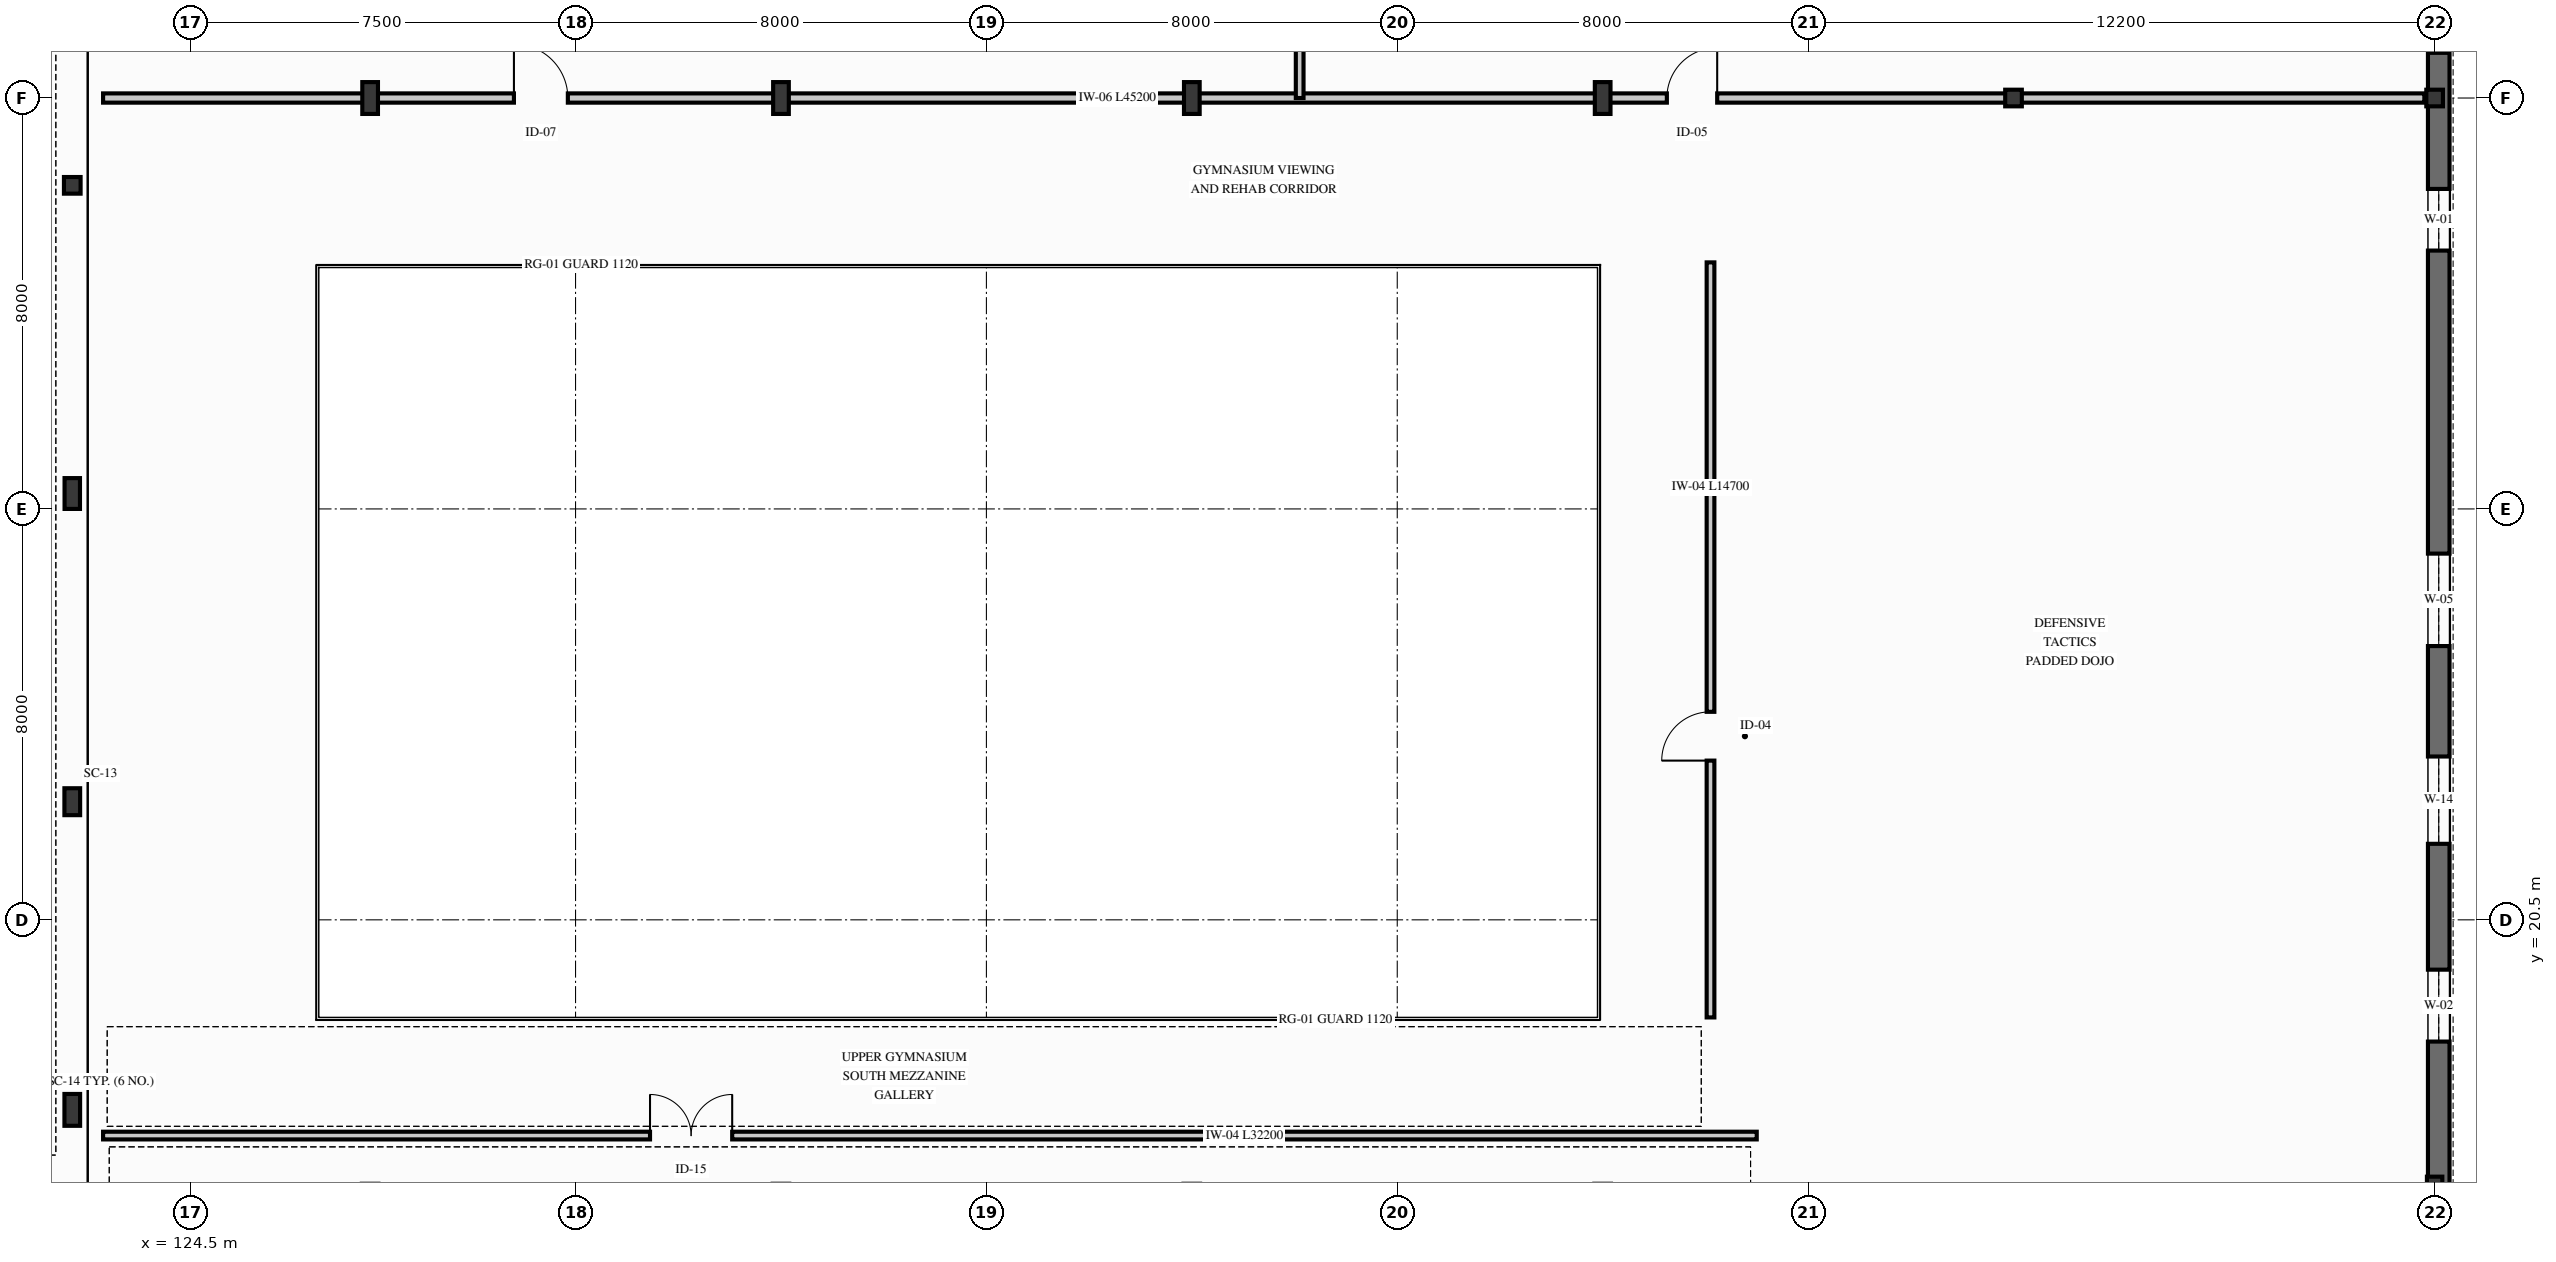
"""IFC4 building model, lengths in metres.
Left out: names, types, materials, properties, quantities, classifications, styles, units other than length and angle.
Written with IfcOpenShell. Run it as: python <this file> out.ifc"""

import sys

from ifc_helpers import new_model, si_unit, direction, frame, frame_2d, origin, origin_2d, place, context, subcontext, project, spatial, rectangle, hollow_circle, i_section, extrude, element, fill, save


model = new_model("IFC4")
c1 = context("Model", 3, precision=1e-05, world=origin(), true_north=direction((0.0, 1.0)))
c2 = subcontext(c1, "Body", "Model", "MODEL_VIEW")
j1 = project(units=[si_unit("LENGTHUNIT", "METRE"), si_unit("PLANEANGLEUNIT", "RADIAN")], contexts=[c1])
p1 = place(None, origin())
s1 = spatial("IfcSite", under=j1, at=p1, CompositionType="ELEMENT")
p2 = place(p1, origin())
s2 = spatial("IfcBuilding", under=s1, at=p2, CompositionType="ELEMENT")
p3 = place(p2, frame((0.0, 0.0, 5.1)))
s3 = spatial("IfcBuildingStorey", under=s2, at=p3, CompositionType="ELEMENT", Elevation=5.1)
p4 = place(p3, frame((122.2, 16.8, 0.0), z_axis=(0.0, 0.0, 1.0), x_axis=(1.0, 0.0, 0.0)))
e1 = element("IfcColumn", 1, at=p4, inside=s3, PredefinedType="COLUMN", context=c2, shape_type="SweptSolid", body=[
    extrude(i_section(OverallWidth=0.305, OverallDepth=0.62, WebThickness=0.021, FlangeThickness=0.04, FilletRadius=0.027, at=origin_2d()), origin(), (0.0, 0.0, 1.0), 3.92),
])
p5 = place(p3, frame((122.2, 22.8, 0.0), z_axis=(0.0, 0.0, 1.0), x_axis=(1.0, 0.0, 0.0)))
e2 = element("IfcColumn", 2, at=p5, inside=s3, PredefinedType="COLUMN", context=c2, shape_type="SweptSolid", body=[
    extrude(i_section(OverallWidth=0.306, OverallDepth=0.524, WebThickness=0.021, FlangeThickness=0.04, FilletRadius=0.027, at=origin_2d()), origin(), (0.0, 0.0, 1.0), 3.92),
])
p6 = place(p3, frame((122.2, 28.8, 0.0), z_axis=(0.0, 0.0, 1.0), x_axis=(1.0, 0.0, 0.0)))
e3 = element("IfcColumn", 3, at=p6, inside=s3, PredefinedType="COLUMN", context=c2, shape_type="SweptSolid", body=[
    extrude(i_section(OverallWidth=0.3, OverallDepth=0.6, WebThickness=0.015, FlangeThickness=0.03, FilletRadius=0.027, at=origin_2d()), origin(), (0.0, 0.0, 1.0), 3.92),
])
p7 = place(p3, frame((122.2, 34.8, 0.0), z_axis=(0.0, 0.0, 1.0), x_axis=(1.0, 0.0, 0.0)))
e4 = element("IfcColumn", 4, at=p7, inside=s3, PredefinedType="COLUMN", context=c2, shape_type="SweptSolid", body=[
    extrude(hollow_circle(Radius=0.162, WallThickness=0.016, at=origin_2d()), origin(), (0.0, 0.0, 1.0), 3.92),
])
for number, where, z_axis, x_axis in (
    (5, (128.0, 36.5, 0.0), (0.0, 0.0, 1.0), (1.0, 0.0, 0.0)),
    (6, (136.0, 36.5, 0.0), (0.0, 0.0, 1.0), (1.0, 0.0, 0.0)),
    (7, (144.0, 36.5, 0.0), (0.0, 0.0, 1.0), (1.0, 0.0, 0.0)),
    (8, (152.0, 36.5, 0.0), (0.0, 0.0, 1.0), (1.0, 0.0, 0.0)),
):
    element("IfcColumn", number, at=place(p3, frame(where, z_axis=z_axis, x_axis=x_axis)), inside=s3, PredefinedType="COLUMN", context=c2, shape_type="SweptSolid", body=[
        extrude(i_section(OverallWidth=0.305, OverallDepth=0.62, WebThickness=0.021, FlangeThickness=0.04, FilletRadius=0.027, at=origin_2d()), origin(), (0.0, 0.0, 1.0), 4.02),
    ])
p8 = place(p3, frame((160.0, 36.5, 0.0), z_axis=(0.0, 0.0, 1.0), x_axis=(1.0, 0.0, 0.0)))
e9 = element("IfcColumn", 9, at=p8, inside=s3, PredefinedType="COLUMN", context=c2, shape_type="SweptSolid", body=[
    extrude(hollow_circle(Radius=0.162, WallThickness=0.016, at=origin_2d()), origin(), (0.0, 0.0, 1.0), 4.02),
])
p9 = place(p3, frame((168.2, 15.2, 0.0), z_axis=(0.0, 0.0, 1.0), x_axis=(1.0, 0.0, 0.0)))
e10 = element("IfcColumn", 10, at=p9, inside=s3, PredefinedType="COLUMN", context=c2, shape_type="SweptSolid", body=[
    extrude(i_section(OverallWidth=0.3, OverallDepth=0.6, WebThickness=0.015, FlangeThickness=0.03, FilletRadius=0.027, at=origin_2d()), origin(), (0.0, 0.0, 1.0), 4.02),
])
p10 = place(p3, frame((168.2, 36.5, 0.0), z_axis=(0.0, 0.0, 1.0), x_axis=(1.0, 0.0, 0.0)))
e11 = element("IfcColumn", 11, at=p10, inside=s3, PredefinedType="COLUMN", context=c2, shape_type="SweptSolid", body=[
    extrude(hollow_circle(Radius=0.162, WallThickness=0.016, at=origin_2d()), origin(), (0.0, 0.0, 1.0), 4.02),
])
p11 = place(p3, frame((168.28, 4.93, 0.0), z_axis=(0.0, 0.0, 1.0), x_axis=(0.0, 1.0, 0.0)))
e12 = element("IfcWall", 12, at=p11, inside=s3, PredefinedType="SOLIDWALL", context=c2, shape_type="SweptSolid", body=[
    extrude(rectangle(XDim=38.35, YDim=0.42, at=frame_2d((19.175, 0.0))), origin(), (0.0, 0.0, 1.0), 3.94),
])
p12 = place(p11, frame((1.65, 0.0, 0.85)))
e13 = element("IfcOpeningElement", 13, at=p12, cuts=e12, PredefinedType="OPENING", context=c2, shape_type="SweptSolid", body=[
    extrude(rectangle(XDim=1.3, YDim=2.15, at=frame_2d((0.65, 1.075))), frame((0.0, 0.22, 0.0), z_axis=(0.0, -1.0, 0.0), x_axis=(1.0, 0.0, 0.0)), (0.0, 0.0, 1.0), 0.44),
])
p13 = place(p11, frame((5.5, 0.0, 0.85)))
e14 = element("IfcOpeningElement", 14, at=p13, cuts=e12, PredefinedType="OPENING", context=c2, shape_type="SweptSolid", body=[
    extrude(rectangle(XDim=1.5, YDim=2.3, at=frame_2d((0.75, 1.15))), frame((0.0, 0.22, 0.0), z_axis=(0.0, -1.0, 0.0), x_axis=(1.0, 0.0, 0.0)), (0.0, 0.0, 1.0), 0.44),
])
p14 = place(p11, frame((13.2, 0.0, 0.85)))
e15 = element("IfcOpeningElement", 15, at=p14, cuts=e12, PredefinedType="OPENING", context=c2, shape_type="SweptSolid", body=[
    extrude(rectangle(XDim=1.4, YDim=2.2, at=frame_2d((0.7, 1.1))), frame((0.0, 0.22, 0.0), z_axis=(0.0, -1.0, 0.0), x_axis=(1.0, 0.0, 0.0)), (0.0, 0.0, 1.0), 0.44),
])
p15 = place(p11, frame((17.05, 0.0, 0.85)))
e16 = element("IfcOpeningElement", 16, at=p15, cuts=e12, PredefinedType="OPENING", context=c2, shape_type="SweptSolid", body=[
    extrude(rectangle(XDim=1.7, YDim=2.35, at=frame_2d((0.85, 1.175))), frame((0.0, 0.22, 0.0), z_axis=(0.0, -1.0, 0.0), x_axis=(1.0, 0.0, 0.0)), (0.0, 0.0, 1.0), 0.44),
])
p16 = place(p11, frame((20.9, 0.0, 0.85)))
e17 = element("IfcOpeningElement", 17, at=p16, cuts=e12, PredefinedType="OPENING", context=c2, shape_type="SweptSolid", body=[
    extrude(rectangle(XDim=1.8, YDim=2.4, at=frame_2d((0.9, 1.2))), frame((0.0, 0.22, 0.0), z_axis=(0.0, -1.0, 0.0), x_axis=(1.0, 0.0, 0.0)), (0.0, 0.0, 1.0), 0.44),
])
p17 = place(p11, frame((28.6, 0.0, 0.85)))
e18 = element("IfcOpeningElement", 18, at=p17, cuts=e12, PredefinedType="OPENING", context=c2, shape_type="SweptSolid", body=[
    extrude(rectangle(XDim=1.2, YDim=2.1, at=frame_2d((0.6, 1.05))), frame((0.0, 0.22, 0.0), z_axis=(0.0, -1.0, 0.0), x_axis=(1.0, 0.0, 0.0)), (0.0, 0.0, 1.0), 0.44),
])
p18 = place(p11, frame((32.45, 0.0, 0.82)))
e19 = element("IfcOpeningElement", 19, at=p18, cuts=e12, PredefinedType="OPENING", context=c2, shape_type="SweptSolid", body=[
    extrude(rectangle(XDim=2.0, YDim=2.5, at=frame_2d((1.0, 1.25))), frame((0.0, 0.22, 0.0), z_axis=(0.0, -1.0, 0.0), x_axis=(1.0, 0.0, 0.0)), (0.0, 0.0, 1.0), 0.44),
])
p19 = place(p3, frame((122.8, 36.5, 0.0), z_axis=(0.0, 0.0, 1.0), x_axis=(1.0, 0.0, 0.0)))
e20 = element("IfcWall", 20, at=p19, inside=s3, PredefinedType="PARTITIONING", context=c2, shape_type="SweptSolid", body=[
    extrude(rectangle(XDim=45.2, YDim=0.18, at=frame_2d((22.6, 0.0))), origin(), (0.0, 0.0, 1.0), 3.92),
])
p20 = place(p19, frame((8.0, 0.0, 0.0)))
e21 = element("IfcOpeningElement", 21, at=p20, cuts=e20, PredefinedType="OPENING", context=c2, shape_type="SweptSolid", body=[
    extrude(rectangle(XDim=1.05, YDim=2.2, at=frame_2d((0.525, 1.1))), frame((0.0, 0.1, 0.0), z_axis=(0.0, -1.0, 0.0), x_axis=(1.0, 0.0, 0.0)), (0.0, 0.0, 1.0), 0.2),
])
p21 = place(p19, frame((30.45, 0.0, 0.0)))
e22 = element("IfcOpeningElement", 22, at=p21, cuts=e20, PredefinedType="OPENING", context=c2, shape_type="SweptSolid", body=[
    extrude(rectangle(XDim=0.98, YDim=2.16, at=frame_2d((0.49, 1.08))), frame((0.0, 0.1, 0.0), z_axis=(0.0, -1.0, 0.0), x_axis=(1.0, 0.0, 0.0)), (0.0, 0.0, 1.0), 0.2),
])
p22 = place(p3, frame((146.1, 36.5, 0.0), z_axis=(0.0, 0.0, 1.0), x_axis=(0.0, 1.0, 0.0)))
e23 = element("IfcWall", 23, at=p22, inside=s3, PredefinedType="PARTITIONING", context=c2, shape_type="SweptSolid", body=[
    extrude(rectangle(XDim=6.5, YDim=0.15, at=frame_2d((3.25, 0.0))), origin(), (0.0, 0.0, 1.0), 3.92),
])
p23 = place(p3, frame((122.8, 16.3, 0.0), z_axis=(0.0, 0.0, 1.0), x_axis=(1.0, 0.0, 0.0)))
e24 = element("IfcWall", 24, at=p23, inside=s3, PredefinedType="PARTITIONING", context=c2, shape_type="SweptSolid", body=[
    extrude(rectangle(XDim=32.2, YDim=0.15, at=frame_2d((16.1, 0.0))), origin(), (0.0, 0.0, 1.0), 3.92),
])
p24 = place(p23, frame((10.65, 0.0, 0.0)))
e25 = element("IfcOpeningElement", 25, at=p24, cuts=e24, PredefinedType="OPENING", context=c2, shape_type="SweptSolid", body=[
    extrude(rectangle(XDim=1.6, YDim=2.3, at=frame_2d((0.8, 1.15))), frame((0.0, 0.085, 0.0), z_axis=(0.0, -1.0, 0.0), x_axis=(1.0, 0.0, 0.0)), (0.0, 0.0, 1.0), 0.17),
])
p25 = place(p3, frame((154.1, 18.6, 0.0), z_axis=(0.0, 0.0, 1.0), x_axis=(0.0, 1.0, 0.0)))
e26 = element("IfcWall", 26, at=p25, inside=s3, PredefinedType="PARTITIONING", context=c2, shape_type="SweptSolid", body=[
    extrude(rectangle(XDim=14.7, YDim=0.15, at=frame_2d((7.35, 0.0))), origin(), (0.0, 0.0, 1.0), 3.92),
])
p26 = place(p25, frame((5.0, 0.0, 0.0)))
e27 = element("IfcOpeningElement", 27, at=p26, cuts=e26, PredefinedType="OPENING", context=c2, shape_type="SweptSolid", body=[
    extrude(rectangle(XDim=0.95, YDim=2.15, at=frame_2d((0.475, 1.075))), frame((0.0, 0.085, 0.0), z_axis=(0.0, -1.0, 0.0), x_axis=(1.0, 0.0, 0.0)), (0.0, 0.0, 1.0), 0.17),
])
p27 = place(p14, origin())
e28 = element("IfcWindow", 28, at=p27, inside=s3, PartitioningType="SINGLE_PANEL", PredefinedType="WINDOW", context=c2, shape_type="SweptSolid", body=[
    extrude(rectangle(XDim=1.4, YDim=2.2, at=frame_2d((0.7, 1.1))), frame((0.0, 0.03, 0.0), z_axis=(0.0, -1.0, 0.0), x_axis=(1.0, 0.0, 0.0)), (0.0, 0.0, 1.0), 0.06),
])
fill(e15, e28)
p28 = place(p15, origin())
e29 = element("IfcWindow", 29, at=p28, inside=s3, PartitioningType="SINGLE_PANEL", PredefinedType="WINDOW", context=c2, shape_type="SweptSolid", body=[
    extrude(rectangle(XDim=1.7, YDim=2.35, at=frame_2d((0.85, 1.175))), frame((0.0, 0.03, 0.0), z_axis=(0.0, -1.0, 0.0), x_axis=(1.0, 0.0, 0.0)), (0.0, 0.0, 1.0), 0.06),
])
fill(e16, e29)
p29 = place(p16, origin())
e30 = element("IfcWindow", 30, at=p29, inside=s3, PartitioningType="SINGLE_PANEL", PredefinedType="WINDOW", context=c2, shape_type="SweptSolid", body=[
    extrude(rectangle(XDim=1.8, YDim=2.4, at=frame_2d((0.9, 1.2))), frame((0.0, 0.03, 0.0), z_axis=(0.0, -1.0, 0.0), x_axis=(1.0, 0.0, 0.0)), (0.0, 0.0, 1.0), 0.06),
])
fill(e17, e30)
p30 = place(p17, origin())
e31 = element("IfcWindow", 31, at=p30, inside=s3, PartitioningType="SINGLE_PANEL", PredefinedType="WINDOW", context=c2, shape_type="SweptSolid", body=[
    extrude(rectangle(XDim=1.2, YDim=2.1, at=frame_2d((0.6, 1.05))), frame((0.0, 0.03, 0.0), z_axis=(0.0, -1.0, 0.0), x_axis=(1.0, 0.0, 0.0)), (0.0, 0.0, 1.0), 0.06),
])
fill(e18, e31)
p31 = place(p18, origin())
e32 = element("IfcWindow", 32, at=p31, inside=s3, PartitioningType="SINGLE_PANEL", PredefinedType="WINDOW", context=c2, shape_type="SweptSolid", body=[
    extrude(rectangle(XDim=2.0, YDim=2.5, at=frame_2d((1.0, 1.25))), frame((0.0, 0.03, 0.0), z_axis=(0.0, -1.0, 0.0), x_axis=(1.0, 0.0, 0.0)), (0.0, 0.0, 1.0), 0.06),
])
fill(e19, e32)
p32 = place(p20, origin())
e33 = element("IfcDoor", 33, at=p32, inside=s3, OperationType="SINGLE_SWING_LEFT", PredefinedType="DOOR", context=c2, shape_type="SweptSolid", body=[
    extrude(rectangle(XDim=1.05, YDim=2.2, at=frame_2d((0.525, 1.1))), frame((0.0, 0.025, 0.0), z_axis=(0.0, -1.0, 0.0), x_axis=(1.0, 0.0, 0.0)), (0.0, 0.0, 1.0), 0.05),
])
fill(e21, e33)
p33 = place(p21, origin())
e34 = element("IfcDoor", 34, at=p33, inside=s3, OperationType="SINGLE_SWING_RIGHT", PredefinedType="DOOR", context=c2, shape_type="SweptSolid", body=[
    extrude(rectangle(XDim=0.98, YDim=2.16, at=frame_2d((0.49, 1.08))), frame((0.0, 0.025, 0.0), z_axis=(0.0, -1.0, 0.0), x_axis=(1.0, 0.0, 0.0)), (0.0, 0.0, 1.0), 0.05),
])
fill(e22, e34)
p34 = place(p24, origin())
e35 = element("IfcDoor", 35, at=p34, inside=s3, OperationType="DOUBLE_DOOR_SINGLE_SWING", PredefinedType="DOOR", context=c2, shape_type="SweptSolid", body=[
    extrude(rectangle(XDim=1.6, YDim=2.3, at=frame_2d((0.8, 1.15))), frame((0.0, 0.025, 0.0), z_axis=(0.0, -1.0, 0.0), x_axis=(1.0, 0.0, 0.0)), (0.0, 0.0, 1.0), 0.05),
])
fill(e25, e35)
p35 = place(p26, origin())
e36 = element("IfcDoor", 36, at=p35, inside=s3, OperationType="SINGLE_SWING_LEFT", PredefinedType="DOOR", context=c2, shape_type="SweptSolid", body=[
    extrude(rectangle(XDim=0.95, YDim=2.15, at=frame_2d((0.475, 1.075))), frame((0.0, 0.025, 0.0), z_axis=(0.0, -1.0, 0.0), x_axis=(1.0, 0.0, 0.0)), (0.0, 0.0, 1.0), 0.05),
])
fill(e27, e36)
save(model, sys.argv[1])
